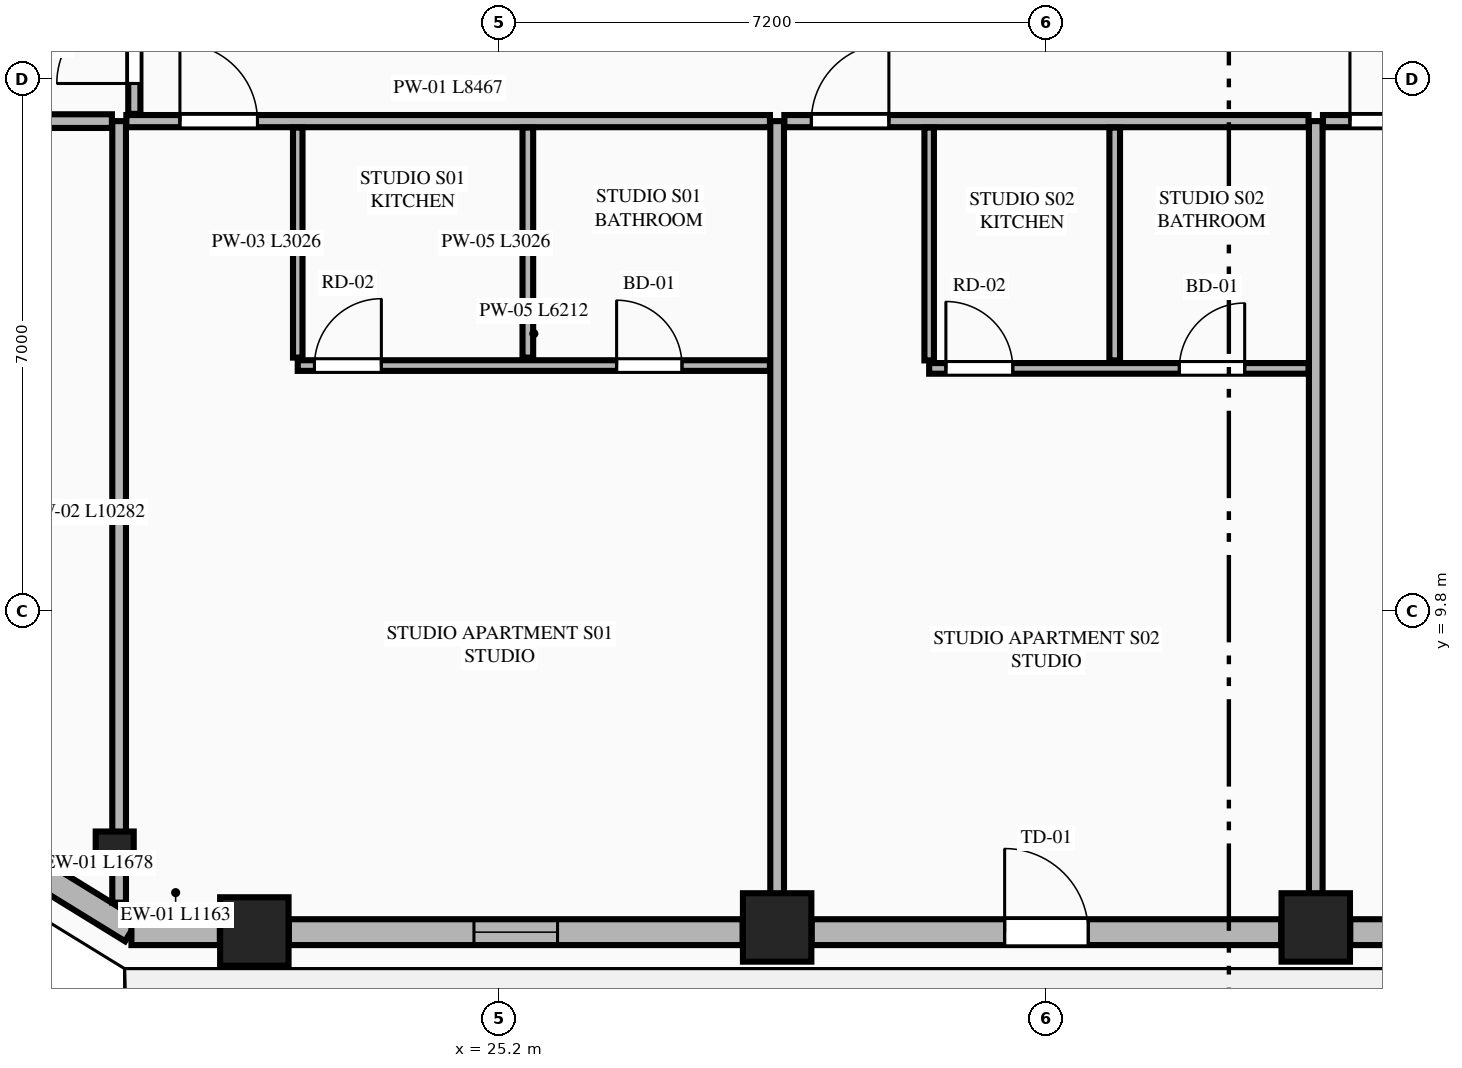
"""IFC4 building model, lengths in metres.
Left out: names, types, materials, properties, quantities, classifications, styles, units other than length and angle.
Written with IfcOpenShell. Run it as: python <this file> out.ifc"""

import sys

from ifc_helpers import new_model, si_unit, direction, frame, frame_2d, origin, origin_2d, place, context, subcontext, project, spatial, rectangle, extrude, element, fill, save


model = new_model("IFC4")
c1 = context("Model", 3, precision=1e-05, world=origin(), true_north=direction((0.0, 1.0)))
c2 = subcontext(c1, "Body", "Model", "MODEL_VIEW")
j1 = project(units=[si_unit("LENGTHUNIT", "METRE"), si_unit("PLANEANGLEUNIT", "RADIAN")], contexts=[c1])
p1 = place(None, origin())
s1 = spatial("IfcSite", under=j1, at=p1, CompositionType="ELEMENT")
p2 = place(p1, origin())
s2 = spatial("IfcBuilding", under=s1, at=p2, CompositionType="ELEMENT")
p3 = place(p2, frame((0.0, 0.0, 200.3)))
s3 = spatial("IfcBuildingStorey", under=s2, at=p3, CompositionType="ELEMENT", Elevation=200.3)
for number, where, z_axis, x_axis in (
    (1, (21.979, 5.589, 0.0), (0.0, 0.0, 1.0), (1.0, 0.0, 0.0)),
    (2, (28.857, 5.642, 0.0), (0.0, 0.0, 1.0), (1.0, 0.0, 0.0)),
    (3, (35.943, 5.642, 0.0), (0.0, 0.0, 1.0), (1.0, 0.0, 0.0)),
):
    element("IfcColumn", number, at=place(p3, frame(where, z_axis=z_axis, x_axis=x_axis)), inside=s3, PredefinedType="COLUMN", context=c2, shape_type="SweptSolid", body=[
        extrude(rectangle(XDim=0.9, YDim=0.9, at=origin_2d()), origin(), (0.0, 0.0, 1.0), 3.55),
    ])
p4 = place(p3, frame((20.142, 6.654, 0.0), z_axis=(0.0, 0.0, 1.0), x_axis=(0.865230187018, -0.501374833306, 0.0)))
e4 = element("IfcColumn", 4, at=p4, inside=s3, PredefinedType="PILASTER", context=c2, shape_type="SweptSolid", body=[
    extrude(rectangle(XDim=0.5, YDim=0.35, at=origin_2d()), origin(), (0.0, 0.0, 1.0), 3.55),
])
p5 = place(p3, frame((18.938, 6.484, 0.0), z_axis=(0.0, 0.0, 1.0), x_axis=(0.851778214877, -0.523902541185, 0.0)))
e5 = element("IfcWall", 5, at=p5, inside=s3, PredefinedType="STANDARD", context=c2, shape_type="SweptSolid", body=[
    extrude(rectangle(XDim=1.678, YDim=0.34, at=frame_2d((0.839, 0.0))), origin(), (0.0, 0.0, 1.0), 3.35),
])
p6 = place(p3, frame((20.362, 5.58, 0.0), z_axis=(0.0, 0.0, 1.0), x_axis=(1.0, 0.0, 0.0)))
e6 = element("IfcWall", 6, at=p6, inside=s3, PredefinedType="STANDARD", context=c2, shape_type="SweptSolid", body=[
    extrude(rectangle(XDim=1.163, YDim=0.34, at=frame_2d((0.582, 0.0))), origin(), (0.0, 0.0, 1.0), 3.35),
])
p7 = place(p3, frame((22.433, 5.58, 0.0), z_axis=(0.0, 0.0, 1.0), x_axis=(1.0, 0.0, 0.0)))
e7 = element("IfcWall", 7, at=p7, inside=s3, PredefinedType="STANDARD", context=c2, shape_type="SweptSolid", body=[
    extrude(rectangle(XDim=5.97, YDim=0.34, at=frame_2d((2.985, 0.0))), origin(), (0.0, 0.0, 1.0), 2.883),
])
p8 = place(p7, frame((2.435, 0.0, 0.75)))
e8 = element("IfcOpeningElement", 8, at=p8, cuts=e7, PredefinedType="OPENING", context=c2, shape_type="SweptSolid", body=[
    extrude(rectangle(XDim=1.1, YDim=1.983, at=frame_2d((0.55, 0.991))), frame((0.0, 0.18, 0.0), z_axis=(0.0, -1.0, 0.0), x_axis=(1.0, 0.0, 0.0)), (0.0, 0.0, 1.0), 0.36),
])
p9 = place(p3, frame((29.311, 5.58, 0.0), z_axis=(0.0, 0.0, 1.0), x_axis=(1.0, 0.0, 0.0)))
e9 = element("IfcWall", 9, at=p9, inside=s3, PredefinedType="STANDARD", context=c2, shape_type="SweptSolid", body=[
    extrude(rectangle(XDim=6.178, YDim=0.34, at=frame_2d((3.089, 0.0))), origin(), (0.0, 0.0, 1.0), 2.883),
])
p10 = place(p9, frame((2.539, 0.0, 0.0)))
e10 = element("IfcOpeningElement", 10, at=p10, cuts=e9, PredefinedType="OPENING", context=c2, shape_type="SweptSolid", body=[
    extrude(rectangle(XDim=1.1, YDim=2.25, at=frame_2d((0.55, 1.125))), frame((0.0, 0.18, 0.0), z_axis=(0.0, -1.0, 0.0), x_axis=(1.0, 0.0, 0.0)), (0.0, 0.0, 1.0), 0.36),
])
p11 = place(p3, frame((36.397, 5.58, 0.0), z_axis=(0.0, 0.0, 1.0), x_axis=(1.0, 0.0, 0.0)))
e11 = element("IfcWall", 11, at=p11, inside=s3, PredefinedType="STANDARD", context=c2, shape_type="SweptSolid", body=[
    extrude(rectangle(XDim=5.97, YDim=0.34, at=frame_2d((2.985, 0.0))), origin(), (0.0, 0.0, 1.0), 2.883),
])
p12 = place(p11, frame((2.435, 0.0, 0.75)))
e12 = element("IfcOpeningElement", 12, at=p12, cuts=e11, PredefinedType="OPENING", context=c2, shape_type="SweptSolid", body=[
    extrude(rectangle(XDim=1.1, YDim=1.983, at=frame_2d((0.55, 0.991))), frame((0.0, 0.18, 0.0), z_axis=(0.0, -1.0, 0.0), x_axis=(1.0, 0.0, 0.0)), (0.0, 0.0, 1.0), 0.36),
])
p13 = place(p3, frame((20.2, 5.968, 0.0), z_axis=(0.0, 0.0, 1.0), x_axis=(0.0, 1.0, 0.0)))
e13 = element("IfcWall", 13, at=p13, inside=s3, PredefinedType="PARTITIONING", context=c2, shape_type="SweptSolid", body=[
    extrude(rectangle(XDim=10.282, YDim=0.18, at=frame_2d((5.141, 0.0))), origin(), (0.0, 0.0, 1.0), 3.35),
])
for number, where, z_axis, x_axis in (
    (14, (28.857, 5.755, 0.0), (0.0, 0.0, 1.0), (0.0, 1.0, 0.0)),
    (15, (35.943, 5.755, 0.0), (0.0, 0.0, 1.0), (0.0, 1.0, 0.0)),
):
    element("IfcWall", number, at=place(p3, frame(where, z_axis=z_axis, x_axis=x_axis)), inside=s3, PredefinedType="PARTITIONING", context=c2, shape_type="SweptSolid", body=[
        extrude(rectangle(XDim=10.495, YDim=0.18, at=frame_2d((5.248, 0.0))), origin(), (0.0, 0.0, 1.0), 2.807),
    ])
p14 = place(p3, frame((20.295, 16.25, 0.0), z_axis=(0.0, 0.0, 1.0), x_axis=(1.0, 0.0, 0.0)))
e16 = element("IfcWall", 16, at=p14, inside=s3, PredefinedType="PARTITIONING", context=c2, shape_type="SweptSolid", body=[
    extrude(rectangle(XDim=8.467, YDim=0.16, at=frame_2d((4.233, 0.0))), origin(), (0.0, 0.0, 1.0), 3.35),
])
p15 = place(p14, frame((0.705, 0.0, 0.0)))
e17 = element("IfcOpeningElement", 17, at=p15, cuts=e16, PredefinedType="OPENING", context=c2, shape_type="SweptSolid", body=[
    extrude(rectangle(XDim=1.02, YDim=2.25, at=frame_2d((0.51, 1.125))), frame((0.0, 0.09, 0.0), z_axis=(0.0, -1.0, 0.0), x_axis=(1.0, 0.0, 0.0)), (0.0, 0.0, 1.0), 0.18),
])
p16 = place(p3, frame((22.55, 13.139, 0.0), z_axis=(0.0, 0.0, 1.0), x_axis=(0.0, 1.0, 0.0)))
e18 = element("IfcWall", 18, at=p16, inside=s3, PredefinedType="PARTITIONING", context=c2, shape_type="SweptSolid", body=[
    extrude(rectangle(XDim=3.026, YDim=0.125, at=frame_2d((1.513, 0.0))), origin(), (0.0, 0.0, 1.0), 2.807),
])
p17 = place(p3, frame((22.55, 13.034, 0.0), z_axis=(0.0, 0.0, 1.0), x_axis=(1.0, 0.0, 0.0)))
e19 = element("IfcWall", 19, at=p17, inside=s3, PredefinedType="PLUMBINGWALL", context=c2, shape_type="SweptSolid", body=[
    extrude(rectangle(XDim=6.212, YDim=0.14, at=frame_2d((3.106, 0.0))), origin(), (0.0, 0.0, 1.0), 3.35),
])
p18 = place(p17, frame((4.195, 0.0, 0.0)))
e20 = element("IfcOpeningElement", 20, at=p18, cuts=e19, PredefinedType="OPENING", context=c2, shape_type="SweptSolid", body=[
    extrude(rectangle(XDim=0.86, YDim=2.1, at=frame_2d((0.43, 1.05))), frame((0.0, 0.08, 0.0), z_axis=(0.0, -1.0, 0.0), x_axis=(1.0, 0.0, 0.0)), (0.0, 0.0, 1.0), 0.16),
])
p19 = place(p17, frame((0.22, 0.0, 0.0)))
e21 = element("IfcOpeningElement", 21, at=p19, cuts=e19, PredefinedType="OPENING", context=c2, shape_type="SweptSolid", body=[
    extrude(rectangle(XDim=0.88, YDim=2.15, at=frame_2d((0.44, 1.075))), frame((0.0, 0.08, 0.0), z_axis=(0.0, -1.0, 0.0), x_axis=(1.0, 0.0, 0.0)), (0.0, 0.0, 1.0), 0.16),
])
p20 = place(p3, frame((25.577, 13.139, 0.0), z_axis=(0.0, 0.0, 1.0), x_axis=(0.0, 1.0, 0.0)))
e22 = element("IfcWall", 22, at=p20, inside=s3, PredefinedType="PLUMBINGWALL", context=c2, shape_type="SweptSolid", body=[
    extrude(rectangle(XDim=3.026, YDim=0.14, at=frame_2d((1.513, 0.0))), origin(), (0.0, 0.0, 1.0), 3.35),
])
p21 = place(p3, frame((28.952, 16.25, 0.0), z_axis=(0.0, 0.0, 1.0), x_axis=(1.0, 0.0, 0.0)))
e23 = element("IfcWall", 23, at=p21, inside=s3, PredefinedType="PARTITIONING", context=c2, shape_type="SweptSolid", body=[
    extrude(rectangle(XDim=6.896, YDim=0.16, at=frame_2d((3.448, 0.0))), origin(), (0.0, 0.0, 1.0), 3.35),
])
p22 = place(p21, frame((0.355, 0.0, 0.0)))
e24 = element("IfcOpeningElement", 24, at=p22, cuts=e23, PredefinedType="OPENING", context=c2, shape_type="SweptSolid", body=[
    extrude(rectangle(XDim=1.02, YDim=2.25, at=frame_2d((0.51, 1.125))), frame((0.0, 0.09, 0.0), z_axis=(0.0, -1.0, 0.0), x_axis=(1.0, 0.0, 0.0)), (0.0, 0.0, 1.0), 0.18),
])
p23 = place(p3, frame((30.857, 13.102, 0.0), z_axis=(0.0, 0.0, 1.0), x_axis=(0.0, 1.0, 0.0)))
e25 = element("IfcWall", 25, at=p23, inside=s3, PredefinedType="PARTITIONING", context=c2, shape_type="SweptSolid", body=[
    extrude(rectangle(XDim=3.063, YDim=0.125, at=frame_2d((1.531, 0.0))), origin(), (0.0, 0.0, 1.0), 3.35),
])
p24 = place(p3, frame((30.857, 12.997, 0.0), z_axis=(0.0, 0.0, 1.0), x_axis=(1.0, 0.0, 0.0)))
e26 = element("IfcWall", 26, at=p24, inside=s3, PredefinedType="PLUMBINGWALL", context=c2, shape_type="SweptSolid", body=[
    extrude(rectangle(XDim=4.991, YDim=0.14, at=frame_2d((2.496, 0.0))), origin(), (0.0, 0.0, 1.0), 3.35),
])
p25 = place(p24, frame((3.291, 0.0, 0.0)))
e27 = element("IfcOpeningElement", 27, at=p25, cuts=e26, PredefinedType="OPENING", context=c2, shape_type="SweptSolid", body=[
    extrude(rectangle(XDim=0.86, YDim=2.1, at=frame_2d((0.43, 1.05))), frame((0.0, 0.08, 0.0), z_axis=(0.0, -1.0, 0.0), x_axis=(1.0, 0.0, 0.0)), (0.0, 0.0, 1.0), 0.16),
])
p26 = place(p24, frame((0.22, 0.0, 0.0)))
e28 = element("IfcOpeningElement", 28, at=p26, cuts=e26, PredefinedType="OPENING", context=c2, shape_type="SweptSolid", body=[
    extrude(rectangle(XDim=0.88, YDim=2.15, at=frame_2d((0.44, 1.075))), frame((0.0, 0.08, 0.0), z_axis=(0.0, -1.0, 0.0), x_axis=(1.0, 0.0, 0.0)), (0.0, 0.0, 1.0), 0.16),
])
p27 = place(p3, frame((33.298, 13.102, 0.0), z_axis=(0.0, 0.0, 1.0), x_axis=(0.0, 1.0, 0.0)))
e29 = element("IfcWall", 29, at=p27, inside=s3, PredefinedType="PLUMBINGWALL", context=c2, shape_type="SweptSolid", body=[
    extrude(rectangle(XDim=3.063, YDim=0.14, at=frame_2d((1.531, 0.0))), origin(), (0.0, 0.0, 1.0), 3.35),
])
p28 = place(p3, frame((36.038, 16.25, 0.0), z_axis=(0.0, 0.0, 1.0), x_axis=(1.0, 0.0, 0.0)))
e30 = element("IfcWall", 30, at=p28, inside=s3, PredefinedType="PARTITIONING", context=c2, shape_type="SweptSolid", body=[
    extrude(rectangle(XDim=8.467, YDim=0.16, at=frame_2d((4.233, 0.0))), origin(), (0.0, 0.0, 1.0), 3.35),
])
p29 = place(p28, frame((0.355, 0.0, 0.0)))
e31 = element("IfcOpeningElement", 31, at=p29, cuts=e30, PredefinedType="OPENING", context=c2, shape_type="SweptSolid", body=[
    extrude(rectangle(XDim=1.02, YDim=2.25, at=frame_2d((0.51, 1.125))), frame((0.0, 0.09, 0.0), z_axis=(0.0, -1.0, 0.0), x_axis=(1.0, 0.0, 0.0)), (0.0, 0.0, 1.0), 0.18),
])
p30 = place(p3, frame((14.211, 16.25, 0.0), z_axis=(0.0, 0.0, 1.0), x_axis=(1.0, 0.0, 0.0)))
e32 = element("IfcWall", 32, at=p30, inside=s3, PredefinedType="PARTITIONING", context=c2, shape_type="SweptSolid", body=[
    extrude(rectangle(XDim=5.894, YDim=0.18, at=frame_2d((2.947, 0.0))), origin(), (0.0, 0.0, 1.0), 3.35),
])
p31 = place(p3, frame((20.4, 16.345, 0.0), z_axis=(0.0, 0.0, 1.0), x_axis=(0.0, 1.0, 0.0)))
e33 = element("IfcWall", 33, at=p31, inside=s3, PredefinedType="PARTITIONING", context=c2, shape_type="SweptSolid", body=[
    extrude(rectangle(XDim=6.236, YDim=0.16, at=frame_2d((3.118, 0.0))), origin(), (0.0, 0.0, 1.0), 3.35),
])
p32 = place(p31, frame((0.4, 0.0, 0.0)))
e34 = element("IfcOpeningElement", 34, at=p32, cuts=e33, PredefinedType="OPENING", context=c2, shape_type="SweptSolid", body=[
    extrude(rectangle(XDim=1.02, YDim=2.25, at=frame_2d((0.51, 1.125))), frame((0.0, 0.09, 0.0), z_axis=(0.0, -1.0, 0.0), x_axis=(1.0, 0.0, 0.0)), (0.0, 0.0, 1.0), 0.18),
])
p33 = place(p8, origin())
e35 = element("IfcWindow", 35, at=p33, inside=s3, PartitioningType="SINGLE_PANEL", PredefinedType="WINDOW", context=c2, shape_type="SweptSolid", body=[
    extrude(rectangle(XDim=1.1, YDim=1.983, at=frame_2d((0.55, 0.991))), frame((0.0, 0.03, 0.0), z_axis=(0.0, -1.0, 0.0), x_axis=(1.0, 0.0, 0.0)), (0.0, 0.0, 1.0), 0.06),
])
fill(e8, e35)
p34 = place(p10, origin())
e36 = element("IfcDoor", 36, at=p34, inside=s3, OperationType="SINGLE_SWING_LEFT", PredefinedType="DOOR", context=c2, shape_type="SweptSolid", body=[
    extrude(rectangle(XDim=1.1, YDim=2.25, at=frame_2d((0.55, 1.125))), frame((0.0, 0.025, 0.0), z_axis=(0.0, -1.0, 0.0), x_axis=(1.0, 0.0, 0.0)), (0.0, 0.0, 1.0), 0.05),
])
fill(e10, e36)
p35 = place(p18, origin())
e37 = element("IfcDoor", 37, at=p35, inside=s3, OperationType="SINGLE_SWING_LEFT", PredefinedType="DOOR", context=c2, shape_type="SweptSolid", body=[
    extrude(rectangle(XDim=0.86, YDim=2.1, at=frame_2d((0.43, 1.05))), frame((0.0, 0.025, 0.0), z_axis=(0.0, -1.0, 0.0), x_axis=(1.0, 0.0, 0.0)), (0.0, 0.0, 1.0), 0.05),
])
fill(e20, e37)
p36 = place(p15, origin())
e38 = element("IfcDoor", 38, at=p36, inside=s3, OperationType="SINGLE_SWING_LEFT", PredefinedType="DOOR", context=c2, shape_type="SweptSolid", body=[
    extrude(rectangle(XDim=1.02, YDim=2.25, at=frame_2d((0.51, 1.125))), frame((0.0, 0.025, 0.0), z_axis=(0.0, -1.0, 0.0), x_axis=(1.0, 0.0, 0.0)), (0.0, 0.0, 1.0), 0.05),
])
fill(e17, e38)
p37 = place(p19, origin())
e39 = element("IfcDoor", 39, at=p37, inside=s3, OperationType="SINGLE_SWING_RIGHT", PredefinedType="DOOR", context=c2, shape_type="SweptSolid", body=[
    extrude(rectangle(XDim=0.88, YDim=2.15, at=frame_2d((0.44, 1.075))), frame((0.0, 0.025, 0.0), z_axis=(0.0, -1.0, 0.0), x_axis=(1.0, 0.0, 0.0)), (0.0, 0.0, 1.0), 0.05),
])
fill(e21, e39)
p38 = place(p25, origin())
e40 = element("IfcDoor", 40, at=p38, inside=s3, OperationType="SINGLE_SWING_RIGHT", PredefinedType="DOOR", context=c2, shape_type="SweptSolid", body=[
    extrude(rectangle(XDim=0.86, YDim=2.1, at=frame_2d((0.43, 1.05))), frame((0.0, 0.025, 0.0), z_axis=(0.0, -1.0, 0.0), x_axis=(1.0, 0.0, 0.0)), (0.0, 0.0, 1.0), 0.05),
])
fill(e27, e40)
p39 = place(p22, origin())
e41 = element("IfcDoor", 41, at=p39, inside=s3, OperationType="SINGLE_SWING_RIGHT", PredefinedType="DOOR", context=c2, shape_type="SweptSolid", body=[
    extrude(rectangle(XDim=1.02, YDim=2.25, at=frame_2d((0.51, 1.125))), frame((0.0, 0.025, 0.0), z_axis=(0.0, -1.0, 0.0), x_axis=(1.0, 0.0, 0.0)), (0.0, 0.0, 1.0), 0.05),
])
fill(e24, e41)
p40 = place(p26, origin())
e42 = element("IfcDoor", 42, at=p40, inside=s3, OperationType="SINGLE_SWING_LEFT", PredefinedType="DOOR", context=c2, shape_type="SweptSolid", body=[
    extrude(rectangle(XDim=0.88, YDim=2.15, at=frame_2d((0.44, 1.075))), frame((0.0, 0.025, 0.0), z_axis=(0.0, -1.0, 0.0), x_axis=(1.0, 0.0, 0.0)), (0.0, 0.0, 1.0), 0.05),
])
fill(e28, e42)
p41 = place(p29, origin())
e43 = element("IfcDoor", 43, at=p41, inside=s3, OperationType="SINGLE_SWING_LEFT", PredefinedType="DOOR", context=c2, shape_type="SweptSolid", body=[
    extrude(rectangle(XDim=1.02, YDim=2.25, at=frame_2d((0.51, 1.125))), frame((0.0, 0.025, 0.0), z_axis=(0.0, -1.0, 0.0), x_axis=(1.0, 0.0, 0.0)), (0.0, 0.0, 1.0), 0.05),
])
fill(e31, e43)
p42 = place(p32, origin())
e44 = element("IfcDoor", 44, at=p42, inside=s3, OperationType="SINGLE_SWING_LEFT", PredefinedType="DOOR", context=c2, shape_type="SweptSolid", body=[
    extrude(rectangle(XDim=1.02, YDim=2.25, at=frame_2d((0.51, 1.125))), frame((0.0, 0.025, 0.0), z_axis=(0.0, -1.0, 0.0), x_axis=(1.0, 0.0, 0.0)), (0.0, 0.0, 1.0), 0.05),
])
fill(e34, e44)
save(model, sys.argv[1])
